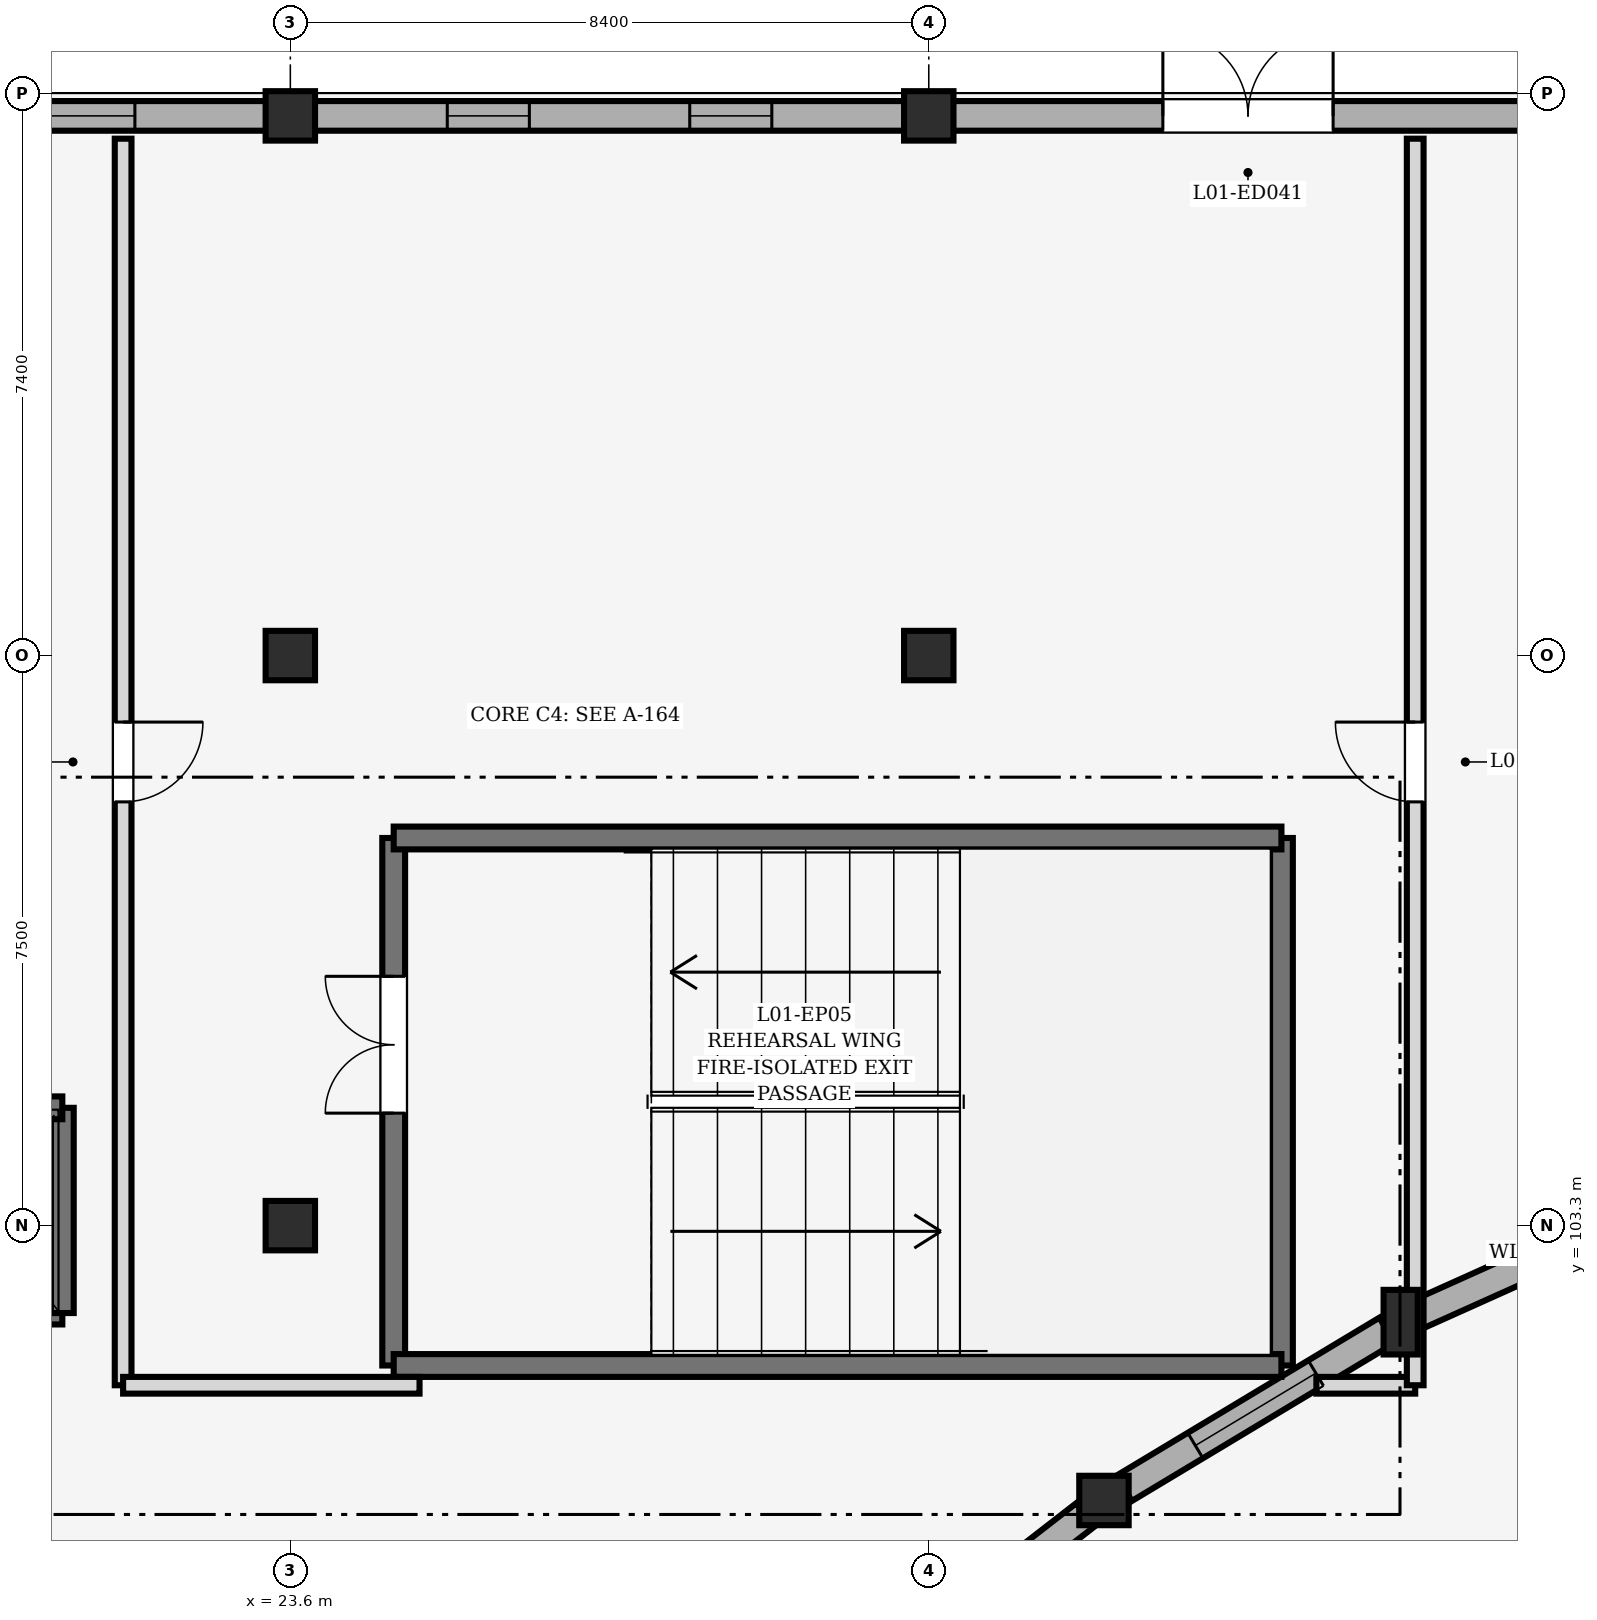
"""IFC4 building model, lengths in metres.
Left out: names, types, materials, properties, quantities, classifications, styles, units other than length and angle.
Written with IfcOpenShell. Run it as: python <this file> out.ifc"""

import sys

from ifc_helpers import new_model, si_unit, direction, frame, frame_2d, origin, origin_2d, place, context, subcontext, project, spatial, rectangle, extrude, element, fill, save


model = new_model("IFC4")
c1 = context("Model", 3, precision=1e-05, world=origin(), true_north=direction((0.0, 1.0)))
c2 = subcontext(c1, "Body", "Model", "MODEL_VIEW")
j1 = project(units=[si_unit("LENGTHUNIT", "METRE"), si_unit("PLANEANGLEUNIT", "RADIAN")], contexts=[c1])
p1 = place(None, origin())
s1 = spatial("IfcSite", under=j1, at=p1, CompositionType="ELEMENT")
p2 = place(p1, origin())
s2 = spatial("IfcBuilding", under=s1, at=p2, CompositionType="ELEMENT")
p3 = place(p2, origin())
s3 = spatial("IfcBuildingStorey", under=s2, at=p3, CompositionType="ELEMENT", Elevation=0.0)
p4 = place(p3, frame((38.209, 102.03, 0.0), z_axis=(0.0, 0.0, 1.0), x_axis=(1.0, 0.0, 0.0)))
e1 = element("IfcColumn", 1, at=p4, inside=s3, PredefinedType="PILASTER", context=c2, shape_type="SweptSolid", body=[
    extrude(rectangle(XDim=0.45, YDim=0.85, at=origin_2d()), origin(), (0.0, 0.0, 1.0), 5.4),
])
for number, where, z_axis, x_axis in (
    (2, (34.305, 99.684, 0.0), (0.0, 0.0, 1.0), (1.0, 0.0, 0.0)),
    (3, (23.6, 103.3, 0.0), (0.0, 0.0, 1.0), (1.0, 0.0, 0.0)),
    (4, (23.6, 110.8, 0.0), (0.0, 0.0, 1.0), (1.0, 0.0, 0.0)),
    (5, (23.6, 117.9, 0.0), (0.0, 0.0, 1.0), (1.0, 0.0, 0.0)),
    (6, (32.0, 110.8, 0.0), (0.0, 0.0, 1.0), (1.0, 0.0, 0.0)),
    (7, (32.0, 117.9, 0.0), (0.0, 0.0, 1.0), (1.0, 0.0, 0.0)),
):
    element("IfcColumn", number, at=place(p3, frame(where, z_axis=z_axis, x_axis=x_axis)), inside=s3, PredefinedType="COLUMN", context=c2, shape_type="SweptSolid", body=[
        extrude(rectangle(XDim=0.65, YDim=0.65, at=origin_2d()), origin(), (0.0, 0.0, 1.0), 5.4),
    ])
p5 = place(p3, frame((42.081, 103.77, 0.0), z_axis=(0.0, 0.0, 1.0), x_axis=(-0.912109351568, -0.409946985331, 0.0)))
e8 = element("IfcWall", 8, at=p5, inside=s3, PredefinedType="STANDARD", context=c2, shape_type="SweptSolid", body=[
    extrude(rectangle(XDim=4.035, YDim=0.39, at=frame_2d((2.018, 0.0))), origin(), (0.0, 0.0, 1.0), 4.6),
])
p6 = place(p3, frame((34.571, 99.844, 0.0), z_axis=(0.0, 0.0, 1.0), x_axis=(0.857145679263, 0.515074057316, 0.0)))
e9 = element("IfcWall", 9, at=p6, inside=s3, PredefinedType="STANDARD", context=c2, shape_type="SweptSolid", body=[
    extrude(rectangle(XDim=4.035, YDim=0.39, at=frame_2d((2.017, 0.0))), origin(), (0.0, 0.0, 1.0), 4.6),
])
p7 = place(p6, frame((1.092, 0.0, 0.85)))
e10 = element("IfcOpeningElement", 10, at=p7, cuts=e9, PredefinedType="OPENING", context=c2, shape_type="SweptSolid", body=[
    extrude(rectangle(XDim=1.85, YDim=1.95, at=frame_2d((0.925, 0.975))), frame((0.0, 0.207, 0.0), z_axis=(0.0, -1.0, 0.0), x_axis=(1.0, 0.0, 0.0)), (0.0, 0.0, 1.0), 0.414),
])
p8 = place(p3, frame((34.06, 99.494, 0.0), z_axis=(0.0, 0.0, 1.0), x_axis=(-0.790149827007, -0.612913738532, 0.0)))
e11 = element("IfcWall", 11, at=p8, inside=s3, PredefinedType="STANDARD", context=c2, shape_type="SweptSolid", body=[
    extrude(rectangle(XDim=4.035, YDim=0.39, at=frame_2d((2.017, 0.0))), origin(), (0.0, 0.0, 1.0), 4.6),
])
p9 = place(p8, frame((1.567, 0.0, 0.85)))
e12 = element("IfcOpeningElement", 12, at=p9, cuts=e11, PredefinedType="OPENING", context=c2, shape_type="SweptSolid", body=[
    extrude(rectangle(XDim=0.9, YDim=1.75, at=frame_2d((0.45, 0.875))), frame((0.0, 0.207, 0.0), z_axis=(0.0, -1.0, 0.0), x_axis=(1.0, 0.0, 0.0)), (0.0, 0.0, 1.0), 0.414),
])
p10 = place(p3, frame((15.51, 117.9, 0.0), z_axis=(0.0, 0.0, 1.0), x_axis=(1.0, 0.0, 0.0)))
e13 = element("IfcWall", 13, at=p10, inside=s3, PredefinedType="STANDARD", context=c2, shape_type="SweptSolid", body=[
    extrude(rectangle(XDim=7.78, YDim=0.39, at=frame_2d((3.89, 0.0))), origin(), (0.0, 0.0, 1.0), 4.427),
])
p11 = place(p10, frame((1.735, 0.0, 0.85)))
e14 = element("IfcOpeningElement", 14, at=p11, cuts=e13, PredefinedType="OPENING", context=c2, shape_type="SweptSolid", body=[
    extrude(rectangle(XDim=1.12, YDim=1.75, at=frame_2d((0.56, 0.875))), frame((0.0, 0.207, 0.0), z_axis=(0.0, -1.0, 0.0), x_axis=(1.0, 0.0, 0.0)), (0.0, 0.0, 1.0), 0.414),
])
p12 = place(p10, frame((4.925, 0.0, 0.85)))
e15 = element("IfcOpeningElement", 15, at=p12, cuts=e13, PredefinedType="OPENING", context=c2, shape_type="SweptSolid", body=[
    extrude(rectangle(XDim=1.12, YDim=1.75, at=frame_2d((0.56, 0.875))), frame((0.0, 0.207, 0.0), z_axis=(0.0, -1.0, 0.0), x_axis=(1.0, 0.0, 0.0)), (0.0, 0.0, 1.0), 0.414),
])
p13 = place(p3, frame((23.91, 117.9, 0.0), z_axis=(0.0, 0.0, 1.0), x_axis=(1.0, 0.0, 0.0)))
e16 = element("IfcWall", 16, at=p13, inside=s3, PredefinedType="STANDARD", context=c2, shape_type="SweptSolid", body=[
    extrude(rectangle(XDim=7.78, YDim=0.39, at=frame_2d((3.89, 0.0))), origin(), (0.0, 0.0, 1.0), 4.377),
])
p14 = place(p13, frame((1.755, 0.0, 0.85)))
e17 = element("IfcOpeningElement", 17, at=p14, cuts=e16, PredefinedType="OPENING", context=c2, shape_type="SweptSolid", body=[
    extrude(rectangle(XDim=1.08, YDim=1.5, at=frame_2d((0.54, 0.75))), frame((0.0, 0.207, 0.0), z_axis=(0.0, -1.0, 0.0), x_axis=(1.0, 0.0, 0.0)), (0.0, 0.0, 1.0), 0.414),
])
p15 = place(p13, frame((4.945, 0.0, 0.85)))
e18 = element("IfcOpeningElement", 18, at=p15, cuts=e16, PredefinedType="OPENING", context=c2, shape_type="SweptSolid", body=[
    extrude(rectangle(XDim=1.08, YDim=1.5, at=frame_2d((0.54, 0.75))), frame((0.0, 0.207, 0.0), z_axis=(0.0, -1.0, 0.0), x_axis=(1.0, 0.0, 0.0)), (0.0, 0.0, 1.0), 0.414),
])
p16 = place(p3, frame((32.31, 117.9, 0.0), z_axis=(0.0, 0.0, 1.0), x_axis=(1.0, 0.0, 0.0)))
e19 = element("IfcWall", 19, at=p16, inside=s3, PredefinedType="STANDARD", context=c2, shape_type="SweptSolid", body=[
    extrude(rectangle(XDim=7.78, YDim=0.39, at=frame_2d((3.89, 0.0))), origin(), (0.0, 0.0, 1.0), 4.525),
])
p17 = place(p16, frame((2.77, 0.0, 0.0)))
e20 = element("IfcOpeningElement", 20, at=p17, cuts=e19, PredefinedType="OPENING", context=c2, shape_type="SweptSolid", body=[
    extrude(rectangle(XDim=2.24, YDim=2.35, at=frame_2d((1.12, 1.175))), frame((0.0, 0.207, 0.0), z_axis=(0.0, -1.0, 0.0), x_axis=(1.0, 0.0, 0.0)), (0.0, 0.0, 1.0), 0.414),
])
p18 = place(p3, frame((24.96, 101.46, 0.0), z_axis=(0.0, 0.0, 1.0), x_axis=(0.0, 1.0, 0.0)))
e21 = element("IfcWall", 21, at=p18, inside=s3, PredefinedType="SHEAR", context=c2, shape_type="SweptSolid", body=[
    extrude(rectangle(XDim=6.94, YDim=0.3, at=frame_2d((3.47, 0.0))), origin(), (0.0, 0.0, 1.0), 5.14),
])
p19 = place(p18, frame((3.32, 0.0, 0.0)))
e22 = element("IfcOpeningElement", 22, at=p19, cuts=e21, PredefinedType="OPENING", context=c2, shape_type="SweptSolid", body=[
    extrude(rectangle(XDim=1.8, YDim=2.2, at=frame_2d((0.9, 1.1))), frame((0.0, 0.162, 0.0), z_axis=(0.0, -1.0, 0.0), x_axis=(1.0, 0.0, 0.0)), (0.0, 0.0, 1.0), 0.324),
])
p20 = place(p3, frame((36.64, 108.4, 0.0), z_axis=(0.0, 0.0, 1.0), x_axis=(0.0, -1.0, 0.0)))
e23 = element("IfcWall", 23, at=p20, inside=s3, PredefinedType="SHEAR", context=c2, shape_type="SweptSolid", body=[
    extrude(rectangle(XDim=6.94, YDim=0.3, at=frame_2d((3.47, 0.0))), origin(), (0.0, 0.0, 1.0), 5.14),
])
for number, where, z_axis, x_axis in (
    (24, (36.64, 101.46, 0.0), (0.0, 0.0, 1.0), (-1.0, 0.0, 0.0)),
    (25, (24.96, 108.4, 0.0), (0.0, 0.0, 1.0), (1.0, 0.0, 0.0)),
):
    element("IfcWall", number, at=place(p3, frame(where, z_axis=z_axis, x_axis=x_axis)), inside=s3, PredefinedType="SHEAR", context=c2, shape_type="SweptSolid", body=[
        extrude(rectangle(XDim=11.68, YDim=0.3, at=frame_2d((5.84, 0.0))), origin(), (0.0, 0.0, 1.0), 5.14),
    ])
p21 = place(p3, frame((20.6, 102.15, 0.0), z_axis=(0.0, 0.0, 1.0), x_axis=(-1.0, 0.0, 0.0)))
e26 = element("IfcWall", 26, at=p21, inside=s3, PredefinedType="SHEAR", context=c2, shape_type="SweptSolid", body=[
    extrude(rectangle(XDim=2.2, YDim=0.3, at=frame_2d((1.1, 0.0))), origin(), (0.0, 0.0, 1.0), 5.14),
])
p22 = place(p21, frame((0.55, 0.0, 0.0)))
e27 = element("IfcOpeningElement", 27, at=p22, cuts=e26, PredefinedType="OPENING", context=c2, shape_type="SweptSolid", body=[
    extrude(rectangle(XDim=1.1, YDim=2.15, at=frame_2d((0.55, 1.075))), frame((0.0, 0.162, 0.0), z_axis=(0.0, -1.0, 0.0), x_axis=(1.0, 0.0, 0.0)), (0.0, 0.0, 1.0), 0.324),
])
p23 = place(p3, frame((20.6, 104.85, 0.0), z_axis=(0.0, 0.0, 1.0), x_axis=(0.0, -1.0, 0.0)))
e28 = element("IfcWall", 28, at=p23, inside=s3, PredefinedType="SHEAR", context=c2, shape_type="SweptSolid", body=[
    extrude(rectangle(XDim=2.7, YDim=0.3, at=frame_2d((1.35, 0.0))), origin(), (0.0, 0.0, 1.0), 5.14),
])
p24 = place(p3, frame((18.4, 104.85, 0.0), z_axis=(0.0, 0.0, 1.0), x_axis=(1.0, 0.0, 0.0)))
e29 = element("IfcWall", 29, at=p24, inside=s3, PredefinedType="SHEAR", context=c2, shape_type="SweptSolid", body=[
    extrude(rectangle(XDim=2.2, YDim=0.3, at=frame_2d((1.1, 0.0))), origin(), (0.0, 0.0, 1.0), 5.14),
])
p25 = place(p3, frame((21.4, 117.6, 0.0), z_axis=(0.0, 0.0, 1.0), x_axis=(0.0, -1.0, 0.0)))
e30 = element("IfcWall", 30, at=p25, inside=s3, PredefinedType="SOLIDWALL", context=c2, shape_type="SweptSolid", body=[
    extrude(rectangle(XDim=16.4, YDim=0.22, at=frame_2d((8.2, 0.0))), origin(), (0.0, 0.0, 1.0), 5.125),
])
p26 = place(p25, frame((7.675, 0.0, 0.0)))
e31 = element("IfcOpeningElement", 31, at=p26, cuts=e30, PredefinedType="OPENING", context=c2, shape_type="SweptSolid", body=[
    extrude(rectangle(XDim=1.05, YDim=2.15, at=frame_2d((0.525, 1.075))), frame((0.0, 0.122, 0.0), z_axis=(0.0, -1.0, 0.0), x_axis=(1.0, 0.0, 0.0)), (0.0, 0.0, 1.0), 0.244),
])
p27 = place(p3, frame((21.4, 101.2, 0.0), z_axis=(0.0, 0.0, 1.0), x_axis=(1.0, 0.0, 0.0)))
e32 = element("IfcWall", 32, at=p27, inside=s3, PredefinedType="SOLIDWALL", context=c2, shape_type="SweptSolid", body=[
    extrude(rectangle(XDim=3.9, YDim=0.22, at=frame_2d((1.95, 0.0))), origin(), (0.0, 0.0, 1.0), 5.125),
])
p28 = place(p3, frame((37.1, 101.2, 0.0), z_axis=(0.0, 0.0, 1.0), x_axis=(1.0, 0.0, 0.0)))
e33 = element("IfcWall", 33, at=p28, inside=s3, PredefinedType="SOLIDWALL", context=c2, shape_type="SweptSolid", body=[
    extrude(rectangle(XDim=1.3, YDim=0.22, at=frame_2d((0.65, 0.0))), origin(), (0.0, 0.0, 1.0), 4.707),
])
p29 = place(p3, frame((38.4, 101.2, 0.0), z_axis=(0.0, 0.0, 1.0), x_axis=(0.0, 1.0, 0.0)))
e34 = element("IfcWall", 34, at=p29, inside=s3, PredefinedType="SOLIDWALL", context=c2, shape_type="SweptSolid", body=[
    extrude(rectangle(XDim=16.4, YDim=0.22, at=frame_2d((8.2, 0.0))), origin(), (0.0, 0.0, 1.0), 4.65),
])
p30 = place(p29, frame((7.675, 0.0, 0.0)))
e35 = element("IfcOpeningElement", 35, at=p30, cuts=e34, PredefinedType="OPENING", context=c2, shape_type="SweptSolid", body=[
    extrude(rectangle(XDim=1.05, YDim=2.15, at=frame_2d((0.525, 1.075))), frame((0.0, 0.122, 0.0), z_axis=(0.0, -1.0, 0.0), x_axis=(1.0, 0.0, 0.0)), (0.0, 0.0, 1.0), 0.244),
])
p31 = place(p7, origin())
e36 = element("IfcWindow", 36, at=p31, inside=s3, PartitioningType="DOUBLE_PANEL_VERTICAL", PredefinedType="WINDOW", context=c2, shape_type="SweptSolid", body=[
    extrude(rectangle(XDim=1.85, YDim=1.95, at=frame_2d((0.925, 0.975))), frame((0.0, 0.03, 0.0), z_axis=(0.0, -1.0, 0.0), x_axis=(1.0, 0.0, 0.0)), (0.0, 0.0, 1.0), 0.06),
])
fill(e10, e36)
p32 = place(p12, origin())
e37 = element("IfcWindow", 37, at=p32, inside=s3, PartitioningType="DOUBLE_PANEL_VERTICAL", PredefinedType="WINDOW", context=c2, shape_type="SweptSolid", body=[
    extrude(rectangle(XDim=1.12, YDim=1.75, at=frame_2d((0.56, 0.875))), frame((0.0, 0.03, 0.0), z_axis=(0.0, -1.0, 0.0), x_axis=(1.0, 0.0, 0.0)), (0.0, 0.0, 1.0), 0.06),
])
fill(e15, e37)
p33 = place(p14, origin())
e38 = element("IfcWindow", 38, at=p33, inside=s3, PartitioningType="DOUBLE_PANEL_VERTICAL", PredefinedType="WINDOW", context=c2, shape_type="SweptSolid", body=[
    extrude(rectangle(XDim=1.08, YDim=1.5, at=frame_2d((0.54, 0.75))), frame((0.0, 0.03, 0.0), z_axis=(0.0, -1.0, 0.0), x_axis=(1.0, 0.0, 0.0)), (0.0, 0.0, 1.0), 0.06),
])
fill(e17, e38)
p34 = place(p15, origin())
e39 = element("IfcWindow", 39, at=p34, inside=s3, PartitioningType="DOUBLE_PANEL_VERTICAL", PredefinedType="WINDOW", context=c2, shape_type="SweptSolid", body=[
    extrude(rectangle(XDim=1.08, YDim=1.5, at=frame_2d((0.54, 0.75))), frame((0.0, 0.03, 0.0), z_axis=(0.0, -1.0, 0.0), x_axis=(1.0, 0.0, 0.0)), (0.0, 0.0, 1.0), 0.06),
])
fill(e18, e39)
p35 = place(p17, origin())
e40 = element("IfcDoor", 40, at=p35, inside=s3, OperationType="DOUBLE_DOOR_SINGLE_SWING", PredefinedType="DOOR", context=c2, shape_type="SweptSolid", body=[
    extrude(rectangle(XDim=2.24, YDim=2.35, at=frame_2d((1.12, 1.175))), frame((0.0, 0.025, 0.0), z_axis=(0.0, -1.0, 0.0), x_axis=(1.0, 0.0, 0.0)), (0.0, 0.0, 1.0), 0.05),
])
fill(e20, e40)
p36 = place(p19, origin())
e41 = element("IfcDoor", 41, at=p36, inside=s3, OperationType="DOUBLE_DOOR_SINGLE_SWING", PredefinedType="DOOR", context=c2, shape_type="SweptSolid", body=[
    extrude(rectangle(XDim=1.8, YDim=2.2, at=frame_2d((0.9, 1.1))), frame((0.0, 0.025, 0.0), z_axis=(0.0, -1.0, 0.0), x_axis=(1.0, 0.0, 0.0)), (0.0, 0.0, 1.0), 0.05),
])
fill(e22, e41)
p37 = place(p26, origin())
e42 = element("IfcDoor", 42, at=p37, inside=s3, OperationType="SINGLE_SWING_LEFT", PredefinedType="DOOR", context=c2, shape_type="SweptSolid", body=[
    extrude(rectangle(XDim=1.05, YDim=2.15, at=frame_2d((0.525, 1.075))), frame((0.0, 0.025, 0.0), z_axis=(0.0, -1.0, 0.0), x_axis=(1.0, 0.0, 0.0)), (0.0, 0.0, 1.0), 0.05),
])
fill(e31, e42)
p38 = place(p30, origin())
e43 = element("IfcDoor", 43, at=p38, inside=s3, OperationType="SINGLE_SWING_RIGHT", PredefinedType="DOOR", context=c2, shape_type="SweptSolid", body=[
    extrude(rectangle(XDim=1.05, YDim=2.15, at=frame_2d((0.525, 1.075))), frame((0.0, 0.025, 0.0), z_axis=(0.0, -1.0, 0.0), x_axis=(1.0, 0.0, 0.0)), (0.0, 0.0, 1.0), 0.05),
])
fill(e35, e43)
save(model, sys.argv[1])
